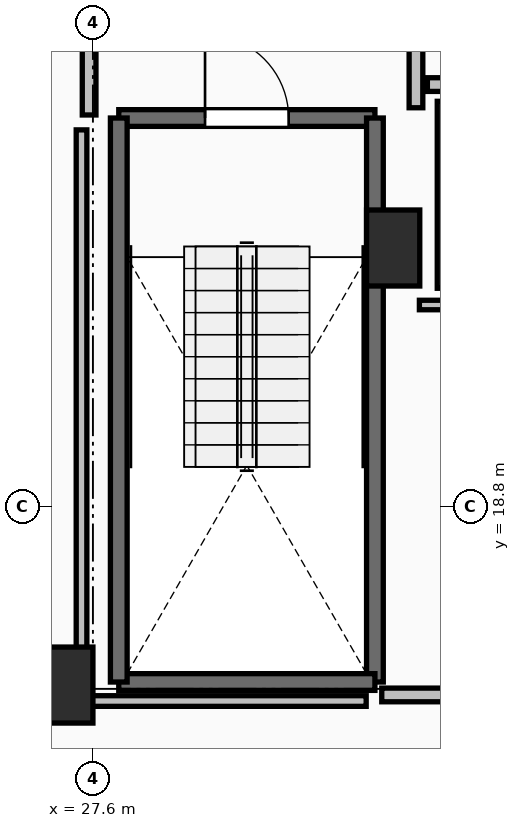
"""IFC4 building model, lengths in metres.
Left out: names, types, materials, properties, quantities, classifications, styles, units other than length and angle.
Written with IfcOpenShell. Run it as: python <this file> out.ifc"""

import sys

from ifc_helpers import new_model, si_unit, direction, frame, frame_2d, origin, origin_2d, place, context, subcontext, project, spatial, rectangle, extrude, element, fill, save


model = new_model("IFC4")
c1 = context("Model", 3, precision=1e-05, world=origin(), true_north=direction((0.0, 1.0)))
c2 = subcontext(c1, "Body", "Model", "MODEL_VIEW")
j1 = project(units=[si_unit("LENGTHUNIT", "METRE"), si_unit("PLANEANGLEUNIT", "RADIAN")], contexts=[c1])
p1 = place(None, origin())
s1 = spatial("IfcSite", under=j1, at=p1, CompositionType="ELEMENT")
p2 = place(p1, origin())
s2 = spatial("IfcBuilding", under=s1, at=p2, CompositionType="ELEMENT")
p3 = place(p2, frame((0.0, 0.0, 234.25)))
s3 = spatial("IfcBuildingStorey", under=s2, at=p3, CompositionType="ELEMENT", Elevation=234.25)
for number, where, z_axis, x_axis in (
    (1, (27.25, 16.45, 0.0), (0.0, 0.0, 1.0), (1.0, 0.0, 0.0)),
    (2, (31.55, 22.2, 0.0), (0.0, 0.0, 1.0), (1.0, 0.0, 0.0)),
):
    element("IfcColumn", number, at=place(p3, frame(where, z_axis=z_axis, x_axis=x_axis)), inside=s3, PredefinedType="PILASTER", context=c2, shape_type="SweptSolid", body=[
        extrude(rectangle(XDim=0.7, YDim=1.0, at=origin_2d()), origin(), (0.0, 0.0, 1.0), 3.55),
    ])
p4 = place(p3, frame((27.94, 23.91, 0.0), z_axis=(0.0, 0.0, 1.0), x_axis=(1.0, 0.0, 0.0)))
e3 = element("IfcWall", 3, at=p4, inside=s3, PredefinedType="SOLIDWALL", context=c2, shape_type="SweptSolid", body=[
    extrude(rectangle(XDim=3.37, YDim=0.22, at=frame_2d((1.685, 0.0))), origin(), (0.0, 0.0, 1.0), 3.29),
])
p5 = place(p4, frame((1.135, 0.0, 0.0)))
e4 = element("IfcOpeningElement", 4, at=p5, cuts=e3, PredefinedType="OPENING", context=c2, shape_type="SweptSolid", body=[
    extrude(rectangle(XDim=1.1, YDim=2.15, at=frame_2d((0.55, 1.075))), frame((0.0, 0.125, 0.0), z_axis=(0.0, -1.0, 0.0), x_axis=(1.0, 0.0, 0.0)), (0.0, 0.0, 1.0), 0.25),
])
p6 = place(p3, frame((31.31, 23.91, 0.0), z_axis=(0.0, 0.0, 1.0), x_axis=(0.0, -1.0, 0.0)))
e5 = element("IfcWall", 5, at=p6, inside=s3, PredefinedType="SOLIDWALL", context=c2, shape_type="SweptSolid", body=[
    extrude(rectangle(XDim=7.42, YDim=0.22, at=frame_2d((3.71, 0.0))), origin(), (0.0, 0.0, 1.0), 3.29),
])
p7 = place(p3, frame((31.31, 16.49, 0.0), z_axis=(0.0, 0.0, 1.0), x_axis=(-1.0, 0.0, 0.0)))
e6 = element("IfcWall", 6, at=p7, inside=s3, PredefinedType="SOLIDWALL", context=c2, shape_type="SweptSolid", body=[
    extrude(rectangle(XDim=3.37, YDim=0.22, at=frame_2d((1.685, 0.0))), origin(), (0.0, 0.0, 1.0), 3.29),
])
p8 = place(p3, frame((27.94, 16.49, 0.0), z_axis=(0.0, 0.0, 1.0), x_axis=(0.0, 1.0, 0.0)))
e7 = element("IfcWall", 7, at=p8, inside=s3, PredefinedType="SOLIDWALL", context=c2, shape_type="SweptSolid", body=[
    extrude(rectangle(XDim=7.42, YDim=0.22, at=frame_2d((3.71, 0.0))), origin(), (0.0, 0.0, 1.0), 3.29),
])
p9 = place(p3, frame((31.85, 24.045, 0.0), z_axis=(0.0, 0.0, 1.0), x_axis=(0.0, 1.0, 0.0)))
e8 = element("IfcWall", 8, at=p9, inside=s3, PredefinedType="PARTITIONING", context=c2, shape_type="SweptSolid", body=[
    extrude(rectangle(XDim=3.91, YDim=0.18, at=frame_2d((1.955, 0.0))), origin(), (0.0, 0.0, 1.0), 3.29),
])
p10 = place(p9, frame((1.355, 0.0, 0.0)))
e9 = element("IfcOpeningElement", 9, at=p10, cuts=e8, PredefinedType="OPENING", context=c2, shape_type="SweptSolid", body=[
    extrude(rectangle(XDim=1.2, YDim=2.15, at=frame_2d((0.6, 1.075))), frame((0.0, 0.105, 0.0), z_axis=(0.0, -1.0, 0.0), x_axis=(1.0, 0.0, 0.0)), (0.0, 0.0, 1.0), 0.21),
])
p11 = place(p3, frame((27.55, 28.0, 0.0), z_axis=(0.0, 0.0, 1.0), x_axis=(0.0, -1.0, 0.0)))
e10 = element("IfcWall", 10, at=p11, inside=s3, PredefinedType="PARTITIONING", context=c2, shape_type="SweptSolid", body=[
    extrude(rectangle(XDim=4.05, YDim=0.18, at=frame_2d((2.025, 0.0))), origin(), (0.0, 0.0, 1.0), 3.29),
])
p12 = place(p11, frame((1.425, 0.0, 0.0)))
e11 = element("IfcOpeningElement", 11, at=p12, cuts=e10, PredefinedType="OPENING", context=c2, shape_type="SweptSolid", body=[
    extrude(rectangle(XDim=1.2, YDim=2.15, at=frame_2d((0.6, 1.075))), frame((0.0, 0.105, 0.0), z_axis=(0.0, -1.0, 0.0), x_axis=(1.0, 0.0, 0.0)), (0.0, 0.0, 1.0), 0.21),
])
p13 = place(p3, frame((32.0, 24.35, 0.0), z_axis=(0.0, 0.0, 1.0), x_axis=(1.0, 0.0, 0.0)))
e12 = element("IfcWall", 12, at=p13, inside=s3, PredefinedType="PARTITIONING", context=c2, shape_type="SweptSolid", body=[
    extrude(rectangle(XDim=6.645, YDim=0.18, at=frame_2d((3.323, 0.0))), origin(), (0.0, 0.0, 1.0), 3.29),
])
p14 = place(p13, frame((2.897, 0.0, 0.0)))
e13 = element("IfcOpeningElement", 13, at=p14, cuts=e12, PredefinedType="OPENING", context=c2, shape_type="SweptSolid", body=[
    extrude(rectangle(XDim=0.85, YDim=2.1, at=frame_2d((0.425, 1.05))), frame((0.0, 0.105, 0.0), z_axis=(0.0, -1.0, 0.0), x_axis=(1.0, 0.0, 0.0)), (0.0, 0.0, 1.0), 0.21),
])
p15 = place(p3, frame((35.05, 21.45, 0.0), z_axis=(0.0, 0.0, 1.0), x_axis=(-1.0, 0.0, 0.0)))
e14 = element("IfcWall", 14, at=p15, inside=s3, PredefinedType="PARTITIONING", context=c2, shape_type="SweptSolid", body=[
    extrude(rectangle(XDim=3.155, YDim=0.125, at=frame_2d((1.578, 0.0))), origin(), (0.0, 0.0, 1.0), 3.29),
])
p16 = place(p3, frame((31.4, 16.32, 0.0), z_axis=(0.0, 0.0, 1.0), x_axis=(1.0, 0.0, 0.0)))
e15 = element("IfcWall", 15, at=p16, inside=s3, PredefinedType="PARTITIONING", context=c2, shape_type="SweptSolid", body=[
    extrude(rectangle(XDim=3.65, YDim=0.18, at=frame_2d((1.825, 0.0))), origin(), (0.0, 0.0, 1.0), 3.29),
])
p17 = place(p16, frame((1.4, 0.0, 0.0)))
e16 = element("IfcOpeningElement", 16, at=p17, cuts=e15, PredefinedType="OPENING", context=c2, shape_type="SweptSolid", body=[
    extrude(rectangle(XDim=0.85, YDim=2.1, at=frame_2d((0.425, 1.05))), frame((0.0, 0.105, 0.0), z_axis=(0.0, -1.0, 0.0), x_axis=(1.0, 0.0, 0.0)), (0.0, 0.0, 1.0), 0.21),
])
p18 = place(p3, frame((32.2, 24.13, 0.0), z_axis=(0.0, 0.0, 1.0), x_axis=(0.0, -1.0, 0.0)))
e17 = element("IfcWall", 17, at=p18, inside=s3, PredefinedType="PARTITIONING", context=c2, shape_type="SweptSolid", body=[
    extrude(rectangle(XDim=2.46, YDim=0.14, at=frame_2d((1.23, 0.0))), origin(), (0.0, 0.0, 1.0), 2.482),
])
p19 = place(p3, frame((27.45, 23.754, 0.0), z_axis=(0.0, 0.0, 1.0), x_axis=(0.0, -1.0, 0.0)))
e18 = element("IfcWall", 18, at=p19, inside=s3, PredefinedType="PARTITIONING", context=c2, shape_type="SweptSolid", body=[
    extrude(rectangle(XDim=7.514, YDim=0.14, at=frame_2d((3.757, 0.0))), origin(), (0.0, 0.0, 1.0), 2.482),
])
p20 = place(p3, frame((27.45, 16.24, 0.0), z_axis=(0.0, 0.0, 1.0), x_axis=(1.0, 0.0, 0.0)))
e19 = element("IfcWall", 19, at=p20, inside=s3, PredefinedType="PARTITIONING", context=c2, shape_type="SweptSolid", body=[
    extrude(rectangle(XDim=3.745, YDim=0.14, at=frame_2d((1.873, 0.0))), origin(), (0.0, 0.0, 1.0), 2.482),
])
p21 = place(p5, origin())
e20 = element("IfcDoor", 20, at=p21, inside=s3, OperationType="SINGLE_SWING_LEFT", PredefinedType="DOOR", context=c2, shape_type="SweptSolid", body=[
    extrude(rectangle(XDim=1.1, YDim=2.15, at=frame_2d((0.55, 1.075))), frame((0.0, 0.025, 0.0), z_axis=(0.0, -1.0, 0.0), x_axis=(1.0, 0.0, 0.0)), (0.0, 0.0, 1.0), 0.05),
])
fill(e4, e20)
save(model, sys.argv[1])
